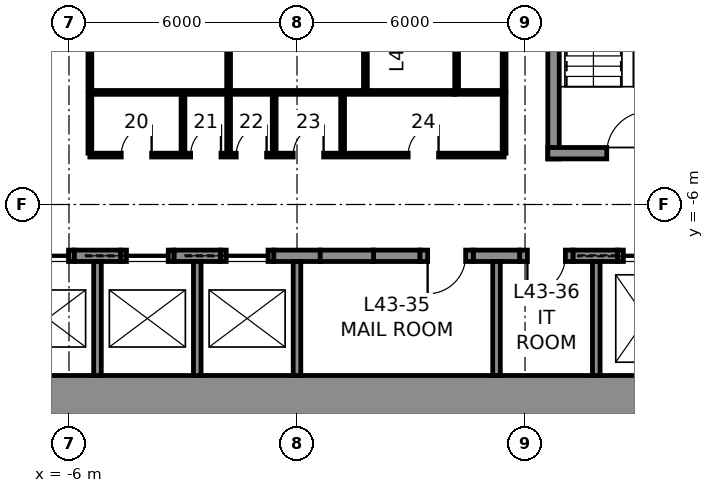
"""IFC4 building model, lengths in metres.
Left out: names, types, materials, properties, quantities, classifications, styles, units other than length and angle.
Written with IfcOpenShell. Run it as: python <this file> out.ifc"""

import sys

from ifc_helpers import new_model, si_unit, direction, frame, frame_2d, origin, place, context, subcontext, project, spatial, rectangle, extrude, element, fill, save


model = new_model("IFC4")
c1 = context("Model", 3, precision=1e-05, world=origin(), true_north=direction((0.0, 1.0)))
c2 = subcontext(c1, "Body", "Model", "MODEL_VIEW")
j1 = project(units=[si_unit("LENGTHUNIT", "METRE"), si_unit("PLANEANGLEUNIT", "RADIAN")], contexts=[c1])
p1 = place(None, origin())
s1 = spatial("IfcSite", under=j1, at=p1, CompositionType="ELEMENT")
p2 = place(p1, origin())
s2 = spatial("IfcBuilding", under=s1, at=p2, CompositionType="ELEMENT")
p3 = place(p2, frame((0.0, 0.0, 201.8)))
s3 = spatial("IfcBuildingStorey", under=s2, at=p3, CompositionType="ELEMENT", Elevation=201.8)
p4 = place(p3, frame((12.0, -11.25, 0.0), z_axis=(0.0, 0.0, 1.0), x_axis=(-1.0, 0.0, 0.0)))
e1 = element("IfcWall", 1, at=p4, inside=s3, PredefinedType="SHEAR", context=c2, shape_type="SweptSolid", body=[
    extrude(rectangle(XDim=24.0, YDim=1.5, at=frame_2d((12.0, 0.0))), origin(), (0.0, 0.0, 1.0), 4.0),
])
for number, where, z_axis, x_axis in (
    (2, (-5.863, -7.35, 0.0), (0.0, 0.0, 1.0), (1.0, 0.0, 0.0)),
    (3, (-3.238, -7.35, 0.0), (0.0, 0.0, 1.0), (1.0, 0.0, 0.0)),
    (4, (-0.613, -7.35, 0.0), (0.0, 0.0, 1.0), (1.0, 0.0, 0.0)),
    (5, (2.012, -7.35, 0.0), (0.0, 0.0, 1.0), (1.0, 0.0, 0.0)),
    (6, (4.637, -7.35, 0.0), (0.0, 0.0, 1.0), (1.0, 0.0, 0.0)),
):
    element("IfcWall", number, at=place(p3, frame(where, z_axis=z_axis, x_axis=x_axis)), inside=s3, PredefinedType="SHEAR", context=c2, shape_type="SweptSolid", body=[
        extrude(rectangle(XDim=1.225, YDim=0.3, at=frame_2d((0.613, 0.0))), origin(), (0.0, 0.0, 1.0), 4.0),
    ])
p5 = place(p3, frame((7.262, -7.35, 0.0), z_axis=(0.0, 0.0, 1.0), x_axis=(1.0, 0.0, 0.0)))
e7 = element("IfcWall", 7, at=p5, inside=s3, PredefinedType="SHEAR", context=c2, shape_type="SweptSolid", body=[
    extrude(rectangle(XDim=1.175, YDim=0.3, at=frame_2d((0.587, 0.0))), origin(), (0.0, 0.0, 1.0), 4.0),
])
p6 = place(p3, frame((-7.262, -7.35, 0.0), z_axis=(0.0, 0.0, 1.0), x_axis=(1.0, 0.0, 0.0)))
e8 = element("IfcWall", 8, at=p6, inside=s3, PredefinedType="PARTITIONING", context=c2, shape_type="SweptSolid", body=[
    extrude(rectangle(XDim=1.4, YDim=0.3, at=frame_2d((0.7, 0.0))), origin(), (0.0, 0.0, 1.0), 4.0),
])
p7 = place(p6, frame((0.15, 0.0, 0.0)))
e9 = element("IfcOpeningElement", 9, at=p7, cuts=e8, PredefinedType="OPENING", context=c2, shape_type="SweptSolid", body=[
    extrude(rectangle(XDim=1.1, YDim=2.3, at=frame_2d((0.55, 1.15))), frame((0.0, 0.16, 0.0), z_axis=(0.0, -1.0, 0.0), x_axis=(1.0, 0.0, 0.0)), (0.0, 0.0, 1.0), 0.32),
])
p8 = place(p3, frame((-4.637, -7.35, 0.0), z_axis=(0.0, 0.0, 1.0), x_axis=(1.0, 0.0, 0.0)))
e10 = element("IfcWall", 10, at=p8, inside=s3, PredefinedType="PARTITIONING", context=c2, shape_type="SweptSolid", body=[
    extrude(rectangle(XDim=1.4, YDim=0.3, at=frame_2d((0.7, 0.0))), origin(), (0.0, 0.0, 1.0), 4.0),
])
p9 = place(p8, frame((0.15, 0.0, 0.0)))
e11 = element("IfcOpeningElement", 11, at=p9, cuts=e10, PredefinedType="OPENING", context=c2, shape_type="SweptSolid", body=[
    extrude(rectangle(XDim=1.1, YDim=2.3, at=frame_2d((0.55, 1.15))), frame((0.0, 0.16, 0.0), z_axis=(0.0, -1.0, 0.0), x_axis=(1.0, 0.0, 0.0)), (0.0, 0.0, 1.0), 0.32),
])
p10 = place(p3, frame((-2.012, -7.35, 0.0), z_axis=(0.0, 0.0, 1.0), x_axis=(1.0, 0.0, 0.0)))
e12 = element("IfcWall", 12, at=p10, inside=s3, PredefinedType="PARTITIONING", context=c2, shape_type="SweptSolid", body=[
    extrude(rectangle(XDim=1.4, YDim=0.3, at=frame_2d((0.7, 0.0))), origin(), (0.0, 0.0, 1.0), 4.0),
])
p11 = place(p10, frame((0.15, 0.0, 0.0)))
e13 = element("IfcOpeningElement", 13, at=p11, cuts=e12, PredefinedType="OPENING", context=c2, shape_type="SweptSolid", body=[
    extrude(rectangle(XDim=1.1, YDim=2.3, at=frame_2d((0.55, 1.15))), frame((0.0, 0.16, 0.0), z_axis=(0.0, -1.0, 0.0), x_axis=(1.0, 0.0, 0.0)), (0.0, 0.0, 1.0), 0.32),
])
p12 = place(p3, frame((0.613, -7.35, 0.0), z_axis=(0.0, 0.0, 1.0), x_axis=(1.0, 0.0, 0.0)))
e14 = element("IfcWall", 14, at=p12, inside=s3, PredefinedType="PARTITIONING", context=c2, shape_type="SweptSolid", body=[
    extrude(rectangle(XDim=1.4, YDim=0.3, at=frame_2d((0.7, 0.0))), origin(), (0.0, 0.0, 1.0), 4.0),
])
p13 = place(p3, frame((3.238, -7.35, 0.0), z_axis=(0.0, 0.0, 1.0), x_axis=(1.0, 0.0, 0.0)))
e15 = element("IfcWall", 15, at=p13, inside=s3, PredefinedType="PARTITIONING", context=c2, shape_type="SweptSolid", body=[
    extrude(rectangle(XDim=1.4, YDim=0.3, at=frame_2d((0.7, 0.0))), origin(), (0.0, 0.0, 1.0), 4.0),
])
p14 = place(p13, frame((0.2, 0.0, 0.0)))
e16 = element("IfcOpeningElement", 16, at=p14, cuts=e15, PredefinedType="OPENING", context=c2, shape_type="SweptSolid", body=[
    extrude(rectangle(XDim=1.0, YDim=2.3, at=frame_2d((0.5, 1.15))), frame((0.0, 0.16, 0.0), z_axis=(0.0, -1.0, 0.0), x_axis=(1.0, 0.0, 0.0)), (0.0, 0.0, 1.0), 0.32),
])
p15 = place(p3, frame((5.863, -7.35, 0.0), z_axis=(0.0, 0.0, 1.0), x_axis=(1.0, 0.0, 0.0)))
e17 = element("IfcWall", 17, at=p15, inside=s3, PredefinedType="PARTITIONING", context=c2, shape_type="SweptSolid", body=[
    extrude(rectangle(XDim=1.4, YDim=0.3, at=frame_2d((0.7, 0.0))), origin(), (0.0, 0.0, 1.0), 4.0),
])
p16 = place(p15, frame((0.2, 0.0, 0.0)))
e18 = element("IfcOpeningElement", 18, at=p16, cuts=e17, PredefinedType="OPENING", context=c2, shape_type="SweptSolid", body=[
    extrude(rectangle(XDim=1.0, YDim=2.3, at=frame_2d((0.5, 1.15))), frame((0.0, 0.16, 0.0), z_axis=(0.0, -1.0, 0.0), x_axis=(1.0, 0.0, 0.0)), (0.0, 0.0, 1.0), 0.32),
])
p17 = place(p3, frame((8.438, -7.35, 0.0), z_axis=(0.0, 0.0, 1.0), x_axis=(1.0, 0.0, 0.0)))
e19 = element("IfcWall", 19, at=p17, inside=s3, PredefinedType="PARTITIONING", context=c2, shape_type="SweptSolid", body=[
    extrude(rectangle(XDim=1.5, YDim=0.3, at=frame_2d((0.75, 0.0))), origin(), (0.0, 0.0, 1.0), 4.0),
])
p18 = place(p17, frame((0.15, 0.0, 0.0)))
e20 = element("IfcOpeningElement", 20, at=p18, cuts=e19, PredefinedType="OPENING", context=c2, shape_type="SweptSolid", body=[
    extrude(rectangle(XDim=1.2, YDim=2.3, at=frame_2d((0.6, 1.15))), frame((0.0, 0.16, 0.0), z_axis=(0.0, -1.0, 0.0), x_axis=(1.0, 0.0, 0.0)), (0.0, 0.0, 1.0), 0.32),
])
for number, where, z_axis, x_axis in (
    (21, (-5.25, -10.5, 0.0), (0.0, 0.0, 1.0), (0.0, 1.0, 0.0)),
    (22, (-2.625, -10.5, 0.0), (0.0, 0.0, 1.0), (0.0, 1.0, 0.0)),
    (23, (0.0, -10.5, 0.0), (0.0, 0.0, 1.0), (0.0, 1.0, 0.0)),
    (24, (5.25, -10.5, 0.0), (0.0, 0.0, 1.0), (0.0, 1.0, 0.0)),
    (25, (7.875, -10.5, 0.0), (0.0, 0.0, 1.0), (0.0, 1.0, 0.0)),
):
    element("IfcWall", number, at=place(p3, frame(where, z_axis=z_axis, x_axis=x_axis)), inside=s3, PredefinedType="PARTITIONING", context=c2, shape_type="SweptSolid", body=[
        extrude(rectangle(XDim=3.0, YDim=0.2, at=frame_2d((1.5, 0.0))), origin(), (0.0, 0.0, 1.0), 4.0),
    ])
p19 = place(p3, frame((6.75, -4.8, 0.0), z_axis=(0.0, 0.0, 1.0), x_axis=(0.0, 1.0, 0.0)))
e26 = element("IfcWall", 26, at=p19, inside=s3, PredefinedType="SOLIDWALL", context=c2, shape_type="SweptSolid", body=[
    extrude(rectangle(XDim=9.6, YDim=0.3, at=frame_2d((4.8, 0.0))), origin(), (0.0, 0.0, 1.0), 3.75),
])
p20 = place(p3, frame((10.5, -4.65, 0.0), z_axis=(0.0, 0.0, 1.0), x_axis=(-1.0, 0.0, 0.0)))
e27 = element("IfcWall", 27, at=p20, inside=s3, PredefinedType="SOLIDWALL", context=c2, shape_type="SweptSolid", body=[
    extrude(rectangle(XDim=3.9, YDim=0.3, at=frame_2d((1.95, 0.0))), origin(), (0.0, 0.0, 1.0), 3.75),
])
p21 = place(p20, frame((1.25, 0.0, 0.0)))
e28 = element("IfcOpeningElement", 28, at=p21, cuts=e27, PredefinedType="OPENING", context=c2, shape_type="SweptSolid", body=[
    extrude(rectangle(XDim=1.1, YDim=2.3, at=frame_2d((0.55, 1.15))), frame((0.0, 0.16, 0.0), z_axis=(0.0, -1.0, 0.0), x_axis=(1.0, 0.0, 0.0)), (0.0, 0.0, 1.0), 0.32),
])
p22 = place(p3, frame((4.15, -3.05, 0.0), z_axis=(0.0, 0.0, 1.0), x_axis=(-1.0, 0.0, 0.0)))
e29 = element("IfcWall", 29, at=p22, inside=s3, PredefinedType="PARTITIONING", context=c2, shape_type="SweptSolid", body=[
    extrude(rectangle(XDim=9.6, YDim=0.1, at=frame_2d((4.8, 0.0))), origin(), (0.0, 0.0, 1.0), 3.75),
])
p23 = place(p3, frame((5.45, -3.05, 0.0), z_axis=(0.0, 0.0, 1.0), x_axis=(-1.0, 0.0, 0.0)))
e30 = element("IfcWall", 30, at=p23, inside=s3, PredefinedType="PARTITIONING", context=c2, shape_type="SweptSolid", body=[
    extrude(rectangle(XDim=1.3, YDim=0.1, at=frame_2d((0.65, 0.0))), origin(), (0.0, 0.0, 1.0), 3.75),
])
for number, where, z_axis, x_axis in (
    (31, (5.45, 3.0, 0.0), (0.0, 0.0, 1.0), (0.0, -1.0, 0.0)),
    (32, (-5.45, -3.0, 0.0), (0.0, 0.0, 1.0), (0.0, 1.0, 0.0)),
    (33, (-1.8, -3.0, 0.0), (0.0, 0.0, 1.0), (0.0, 1.0, 0.0)),
    (34, (1.8, -3.0, 0.0), (0.0, 0.0, 1.0), (0.0, 1.0, 0.0)),
    (35, (4.2, -3.0, 0.0), (0.0, 0.0, 1.0), (0.0, 1.0, 0.0)),
):
    element("IfcWall", number, at=place(p3, frame(where, z_axis=z_axis, x_axis=x_axis)), inside=s3, PredefinedType="PARTITIONING", context=c2, shape_type="SweptSolid", body=[
        extrude(rectangle(XDim=6.0, YDim=0.1, at=frame_2d((3.0, 0.0))), origin(), (0.0, 0.0, 1.0), 3.75),
    ])
p24 = place(p3, frame((5.45, -4.7, 0.0), z_axis=(0.0, 0.0, 1.0), x_axis=(-1.0, 0.0, 0.0)))
e36 = element("IfcWall", 36, at=p24, inside=s3, PredefinedType="PARTITIONING", context=c2, shape_type="SweptSolid", body=[
    extrude(rectangle(XDim=10.9, YDim=0.1, at=frame_2d((5.45, 0.0))), origin(), (0.0, 0.0, 1.0), 3.75),
])
p25 = place(p24, frame((9.275, 0.0, 0.0)))
e37 = element("IfcOpeningElement", 37, at=p25, cuts=e36, PredefinedType="OPENING", context=c2, shape_type="SweptSolid", body=[
    extrude(rectangle(XDim=0.8, YDim=2.3, at=frame_2d((0.4, 1.15))), frame((0.0, 0.06, 0.0), z_axis=(0.0, -1.0, 0.0), x_axis=(1.0, 0.0, 0.0)), (0.0, 0.0, 1.0), 0.12),
])
p26 = place(p24, frame((7.45, 0.0, 0.0)))
e38 = element("IfcOpeningElement", 38, at=p26, cuts=e36, PredefinedType="OPENING", context=c2, shape_type="SweptSolid", body=[
    extrude(rectangle(XDim=0.8, YDim=2.3, at=frame_2d((0.4, 1.15))), frame((0.0, 0.06, 0.0), z_axis=(0.0, -1.0, 0.0), x_axis=(1.0, 0.0, 0.0)), (0.0, 0.0, 1.0), 0.12),
])
p27 = place(p24, frame((6.25, 0.0, 0.0)))
e39 = element("IfcOpeningElement", 39, at=p27, cuts=e36, PredefinedType="OPENING", context=c2, shape_type="SweptSolid", body=[
    extrude(rectangle(XDim=0.8, YDim=2.3, at=frame_2d((0.4, 1.15))), frame((0.0, 0.06, 0.0), z_axis=(0.0, -1.0, 0.0), x_axis=(1.0, 0.0, 0.0)), (0.0, 0.0, 1.0), 0.12),
])
p28 = place(p24, frame((4.75, 0.0, 0.0)))
e40 = element("IfcOpeningElement", 40, at=p28, cuts=e36, PredefinedType="OPENING", context=c2, shape_type="SweptSolid", body=[
    extrude(rectangle(XDim=0.8, YDim=2.3, at=frame_2d((0.4, 1.15))), frame((0.0, 0.06, 0.0), z_axis=(0.0, -1.0, 0.0), x_axis=(1.0, 0.0, 0.0)), (0.0, 0.0, 1.0), 0.12),
])
p29 = place(p24, frame((1.725, 0.0, 0.0)))
e41 = element("IfcOpeningElement", 41, at=p29, cuts=e36, PredefinedType="OPENING", context=c2, shape_type="SweptSolid", body=[
    extrude(rectangle(XDim=0.8, YDim=2.3, at=frame_2d((0.4, 1.15))), frame((0.0, 0.06, 0.0), z_axis=(0.0, -1.0, 0.0), x_axis=(1.0, 0.0, 0.0)), (0.0, 0.0, 1.0), 0.12),
])
for number, where, z_axis, x_axis in (
    (42, (-5.45, -3.1, 0.0), (0.0, 0.0, 1.0), (0.0, -1.0, 0.0)),
    (43, (5.45, -3.1, 0.0), (0.0, 0.0, 1.0), (0.0, -1.0, 0.0)),
    (44, (-3.0, -3.1, 0.0), (0.0, 0.0, 1.0), (0.0, -1.0, 0.0)),
    (45, (-1.8, -3.1, 0.0), (0.0, 0.0, 1.0), (0.0, -1.0, 0.0)),
    (46, (-0.6, -3.1, 0.0), (0.0, 0.0, 1.0), (0.0, -1.0, 0.0)),
    (47, (1.2, -3.1, 0.0), (0.0, 0.0, 1.0), (0.0, -1.0, 0.0)),
):
    element("IfcWall", number, at=place(p3, frame(where, z_axis=z_axis, x_axis=x_axis)), inside=s3, PredefinedType="PARTITIONING", context=c2, shape_type="SweptSolid", body=[
        extrude(rectangle(XDim=1.55, YDim=0.1, at=frame_2d((0.775, 0.0))), origin(), (0.0, 0.0, 1.0), 3.75),
    ])
p30 = place(p21, frame((1.1, 0.0, 0.0), z_axis=(0.0, 0.0, 1.0), x_axis=(-1.0, 0.0, 0.0)))
e48 = element("IfcDoor", 48, at=p30, inside=s3, OperationType="SINGLE_SWING_RIGHT", PredefinedType="DOOR", context=c2, shape_type="SweptSolid", body=[
    extrude(rectangle(XDim=1.1, YDim=2.3, at=frame_2d((0.55, 1.15))), frame((0.0, 0.025, 0.0), z_axis=(0.0, -1.0, 0.0), x_axis=(1.0, 0.0, 0.0)), (0.0, 0.0, 1.0), 0.05),
])
fill(e28, e48)
p31 = place(p25, frame((0.8, 0.0, 0.0), z_axis=(0.0, 0.0, 1.0), x_axis=(-1.0, 0.0, 0.0)))
e49 = element("IfcDoor", 49, at=p31, inside=s3, OperationType="SINGLE_SWING_RIGHT", PredefinedType="DOOR", context=c2, shape_type="SweptSolid", body=[
    extrude(rectangle(XDim=0.8, YDim=2.3, at=frame_2d((0.4, 1.15))), frame((0.0, 0.025, 0.0), z_axis=(0.0, -1.0, 0.0), x_axis=(1.0, 0.0, 0.0)), (0.0, 0.0, 1.0), 0.05),
])
fill(e37, e49)
p32 = place(p26, frame((0.8, 0.0, 0.0), z_axis=(0.0, 0.0, 1.0), x_axis=(-1.0, 0.0, 0.0)))
e50 = element("IfcDoor", 50, at=p32, inside=s3, OperationType="SINGLE_SWING_RIGHT", PredefinedType="DOOR", context=c2, shape_type="SweptSolid", body=[
    extrude(rectangle(XDim=0.8, YDim=2.3, at=frame_2d((0.4, 1.15))), frame((0.0, 0.025, 0.0), z_axis=(0.0, -1.0, 0.0), x_axis=(1.0, 0.0, 0.0)), (0.0, 0.0, 1.0), 0.05),
])
fill(e38, e50)
p33 = place(p27, frame((0.8, 0.0, 0.0), z_axis=(0.0, 0.0, 1.0), x_axis=(-1.0, 0.0, 0.0)))
e51 = element("IfcDoor", 51, at=p33, inside=s3, OperationType="SINGLE_SWING_RIGHT", PredefinedType="DOOR", context=c2, shape_type="SweptSolid", body=[
    extrude(rectangle(XDim=0.8, YDim=2.3, at=frame_2d((0.4, 1.15))), frame((0.0, 0.025, 0.0), z_axis=(0.0, -1.0, 0.0), x_axis=(1.0, 0.0, 0.0)), (0.0, 0.0, 1.0), 0.05),
])
fill(e39, e51)
p34 = place(p28, frame((0.8, 0.0, 0.0), z_axis=(0.0, 0.0, 1.0), x_axis=(-1.0, 0.0, 0.0)))
e52 = element("IfcDoor", 52, at=p34, inside=s3, OperationType="SINGLE_SWING_RIGHT", PredefinedType="DOOR", context=c2, shape_type="SweptSolid", body=[
    extrude(rectangle(XDim=0.8, YDim=2.3, at=frame_2d((0.4, 1.15))), frame((0.0, 0.025, 0.0), z_axis=(0.0, -1.0, 0.0), x_axis=(1.0, 0.0, 0.0)), (0.0, 0.0, 1.0), 0.05),
])
fill(e40, e52)
p35 = place(p29, frame((0.8, 0.0, 0.0), z_axis=(0.0, 0.0, 1.0), x_axis=(-1.0, 0.0, 0.0)))
e53 = element("IfcDoor", 53, at=p35, inside=s3, OperationType="SINGLE_SWING_RIGHT", PredefinedType="DOOR", context=c2, shape_type="SweptSolid", body=[
    extrude(rectangle(XDim=0.8, YDim=2.3, at=frame_2d((0.4, 1.15))), frame((0.0, 0.025, 0.0), z_axis=(0.0, -1.0, 0.0), x_axis=(1.0, 0.0, 0.0)), (0.0, 0.0, 1.0), 0.05),
])
fill(e41, e53)
p36 = place(p14, frame((1.0, 0.0, 0.0), z_axis=(0.0, 0.0, 1.0), x_axis=(-1.0, 0.0, 0.0)))
e54 = element("IfcDoor", 54, at=p36, inside=s3, OperationType="SINGLE_SWING_RIGHT", PredefinedType="DOOR", context=c2, shape_type="SweptSolid", body=[
    extrude(rectangle(XDim=1.0, YDim=2.3, at=frame_2d((0.5, 1.15))), frame((0.0, 0.025, 0.0), z_axis=(0.0, -1.0, 0.0), x_axis=(1.0, 0.0, 0.0)), (0.0, 0.0, 1.0), 0.05),
])
fill(e16, e54)
p37 = place(p16, frame((1.0, 0.0, 0.0), z_axis=(0.0, 0.0, 1.0), x_axis=(-1.0, 0.0, 0.0)))
e55 = element("IfcDoor", 55, at=p37, inside=s3, OperationType="SINGLE_SWING_RIGHT", PredefinedType="DOOR", context=c2, shape_type="SweptSolid", body=[
    extrude(rectangle(XDim=1.0, YDim=2.3, at=frame_2d((0.5, 1.15))), frame((0.0, 0.025, 0.0), z_axis=(0.0, -1.0, 0.0), x_axis=(1.0, 0.0, 0.0)), (0.0, 0.0, 1.0), 0.05),
])
fill(e18, e55)
p38 = place(p18, origin())
e56 = element("IfcDoor", 56, at=p38, inside=s3, OperationType="SLIDING_TO_LEFT", PredefinedType="DOOR", context=c2, shape_type="SweptSolid", body=[
    extrude(rectangle(XDim=1.2, YDim=2.3, at=frame_2d((0.6, 1.15))), frame((0.0, 0.025, 0.0), z_axis=(0.0, -1.0, 0.0), x_axis=(1.0, 0.0, 0.0)), (0.0, 0.0, 1.0), 0.05),
])
fill(e20, e56)
p39 = place(p11, origin())
e57 = element("IfcDoor", 57, at=p39, inside=s3, OperationType="SLIDING_TO_LEFT", PredefinedType="DOOR", context=c2, shape_type="SweptSolid", body=[
    extrude(rectangle(XDim=1.1, YDim=2.3, at=frame_2d((0.55, 1.15))), frame((0.0, 0.025, 0.0), z_axis=(0.0, -1.0, 0.0), x_axis=(1.0, 0.0, 0.0)), (0.0, 0.0, 1.0), 0.05),
])
fill(e13, e57)
p40 = place(p9, origin())
e58 = element("IfcDoor", 58, at=p40, inside=s3, OperationType="SLIDING_TO_LEFT", PredefinedType="DOOR", context=c2, shape_type="SweptSolid", body=[
    extrude(rectangle(XDim=1.1, YDim=2.3, at=frame_2d((0.55, 1.15))), frame((0.0, 0.025, 0.0), z_axis=(0.0, -1.0, 0.0), x_axis=(1.0, 0.0, 0.0)), (0.0, 0.0, 1.0), 0.05),
])
fill(e11, e58)
p41 = place(p7, origin())
e59 = element("IfcDoor", 59, at=p41, inside=s3, OperationType="SLIDING_TO_LEFT", PredefinedType="DOOR", context=c2, shape_type="SweptSolid", body=[
    extrude(rectangle(XDim=1.1, YDim=2.3, at=frame_2d((0.55, 1.15))), frame((0.0, 0.025, 0.0), z_axis=(0.0, -1.0, 0.0), x_axis=(1.0, 0.0, 0.0)), (0.0, 0.0, 1.0), 0.05),
])
fill(e9, e59)
save(model, sys.argv[1])
